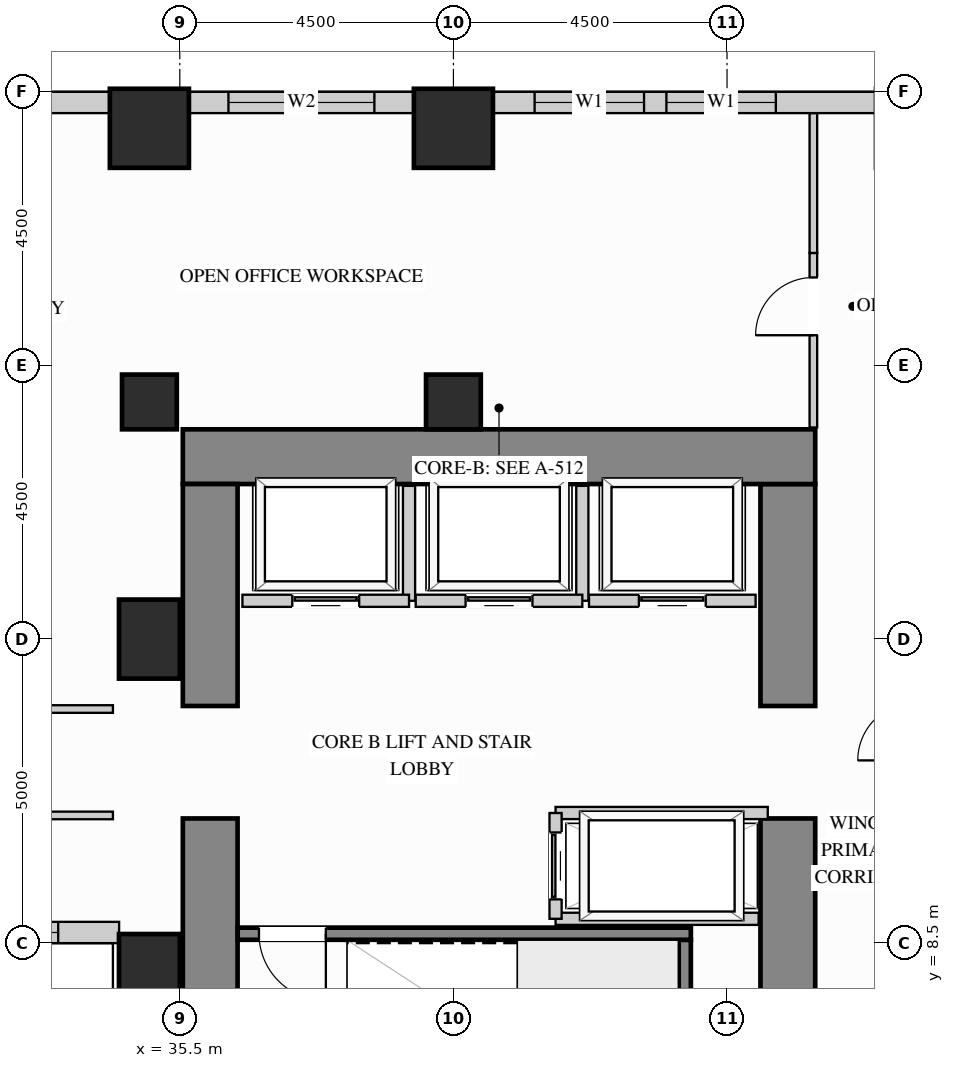
"""IFC4 building model, lengths in metres.
Left out: names, types, materials, properties, quantities, classifications, styles, units other than length and angle.
Written with IfcOpenShell. Run it as: python <this file> out.ifc"""

import sys

from ifc_helpers import new_model, si_unit, direction, frame, frame_2d, origin, origin_2d, place, context, subcontext, project, spatial, rectangle, extrude, source, transform, mapped, element, fill, save


model = new_model("IFC4")
c1 = context("Model", 3, precision=1e-05, world=origin(), true_north=direction((0.0, 1.0)))
c2 = subcontext(c1, "Body", "Model", "MODEL_VIEW")
j1 = project(units=[si_unit("LENGTHUNIT", "METRE"), si_unit("PLANEANGLEUNIT", "RADIAN")], contexts=[c1])
p1 = place(None, origin())
s1 = spatial("IfcSite", under=j1, at=p1, CompositionType="ELEMENT")
p2 = place(p1, origin())
s2 = spatial("IfcBuilding", under=s1, at=p2, CompositionType="ELEMENT")
p3 = place(p2, frame((0.0, 0.0, 65.7)))
s3 = spatial("IfcBuildingStorey", under=s2, at=p3, CompositionType="ELEMENT", Elevation=65.7)
m1 = source(origin(), c2, "Body", "SweptSolid", [
    extrude(rectangle(XDim=0.9, YDim=0.9, at=origin_2d()), origin(), (0.0, 0.0, 1.0), 3.38),
])
for number, where, z_axis, x_axis in (
    (1, (35.0, 17.4, 0.0), (0.0, 0.0, 1.0), (1.0, 0.0, 0.0)),
    (2, (40.0, 17.4, 0.0), (0.0, 0.0, 1.0), (1.0, 0.0, 0.0)),
):
    element("IfcColumn", number, at=place(p3, frame(where, z_axis=z_axis, x_axis=x_axis)), inside=s3, PredefinedType="COLUMN", context=c2, shape_type="MappedRepresentation", body=[
        mapped(m1, transform((0.0, 0.0, 0.0), x_axis=(1.0, 0.0, 0.0), y_axis=(0.0, 1.0, 0.0), z_axis=(0.0, 0.0, 1.0))),
    ])
m2 = source(origin(), c2, "Body", "SweptSolid", [
    extrude(rectangle(XDim=1.0, YDim=1.3, at=origin_2d()), origin(), (0.0, 0.0, 1.0), 3.38),
])
for number, where, z_axis, x_axis in (
    (3, (35.0, 13.5, 0.0), (0.0, 0.0, 1.0), (1.0, 0.0, 0.0)),
    (4, (35.0, 8.0, 0.0), (0.0, 0.0, 1.0), (1.0, 0.0, 0.0)),
):
    element("IfcColumn", number, at=place(p3, frame(where, z_axis=z_axis, x_axis=x_axis)), inside=s3, PredefinedType="COLUMN", context=c2, shape_type="MappedRepresentation", body=[
        mapped(m2, transform((0.0, 0.0, 0.0), x_axis=(1.0, 0.0, 0.0), y_axis=(0.0, 1.0, 0.0), z_axis=(0.0, 0.0, 1.0))),
    ])
m3 = source(origin(), c2, "Body", "SweptSolid", [
    extrude(rectangle(XDim=1.3, YDim=1.3, at=origin_2d()), origin(), (0.0, 0.0, 1.0), 3.38),
])
for number, where, z_axis, x_axis in (
    (5, (35.0, 21.9, 0.0), (0.0, 0.0, 1.0), (1.0, 0.0, 0.0)),
    (6, (40.0, 21.9, 0.0), (0.0, 0.0, 1.0), (1.0, 0.0, 0.0)),
):
    element("IfcColumn", number, at=place(p3, frame(where, z_axis=z_axis, x_axis=x_axis)), inside=s3, PredefinedType="COLUMN", context=c2, shape_type="MappedRepresentation", body=[
        mapped(m3, transform((0.0, 0.0, 0.0), x_axis=(1.0, 0.0, 0.0), y_axis=(0.0, 1.0, 0.0), z_axis=(0.0, 0.0, 1.0))),
    ])
m4 = source(origin(), c2, "Body", "SweptSolid", [
    extrude(rectangle(XDim=5.6, YDim=0.9, at=frame_2d((2.8, 0.0))), origin(), (0.0, 0.0, 1.0), 3.38),
])
p4 = place(p3, frame((45.5, 4.95, 0.0), z_axis=(0.0, 0.0, 1.0), x_axis=(0.0, 1.0, 0.0)))
e7 = element("IfcWall", 7, at=p4, inside=s3, PredefinedType="SHEAR", context=c2, shape_type="MappedRepresentation", body=[
    mapped(m4, transform((0.0, 0.0, 0.0), x_axis=(1.0, 0.0, 0.0), y_axis=(0.0, 1.0, 0.0), z_axis=(0.0, 0.0, 1.0))),
])
m5 = source(origin(), c2, "Body", "SweptSolid", [
    extrude(rectangle(XDim=3.65, YDim=0.9, at=frame_2d((1.825, 0.0))), origin(), (0.0, 0.0, 1.0), 3.38),
])
p5 = place(p3, frame((45.5, 12.4, 0.0), z_axis=(0.0, 0.0, 1.0), x_axis=(0.0, 1.0, 0.0)))
e8 = element("IfcWall", 8, at=p5, inside=s3, PredefinedType="SHEAR", context=c2, shape_type="MappedRepresentation", body=[
    mapped(m5, transform((0.0, 0.0, 0.0), x_axis=(1.0, 0.0, 0.0), y_axis=(0.0, 1.0, 0.0), z_axis=(0.0, 0.0, 1.0))),
])
m6 = source(origin(), c2, "Body", "SweptSolid", [
    extrude(rectangle(XDim=10.4, YDim=0.9, at=frame_2d((5.2, 0.0))), origin(), (0.0, 0.0, 1.0), 3.38),
])
p6 = place(p3, frame((35.55, 16.5, 0.0), z_axis=(0.0, 0.0, 1.0), x_axis=(1.0, 0.0, 0.0)))
e9 = element("IfcWall", 9, at=p6, inside=s3, PredefinedType="SHEAR", context=c2, shape_type="MappedRepresentation", body=[
    mapped(m6, transform((0.0, 0.0, 0.0), x_axis=(1.0, 0.0, 0.0), y_axis=(0.0, 1.0, 0.0), z_axis=(0.0, 0.0, 1.0))),
])
p7 = place(p3, frame((36.0, 4.95, 0.0), z_axis=(0.0, 0.0, 1.0), x_axis=(0.0, 1.0, 0.0)))
e10 = element("IfcWall", 10, at=p7, inside=s3, PredefinedType="SHEAR", context=c2, shape_type="MappedRepresentation", body=[
    mapped(m4, transform((0.0, 0.0, 0.0), x_axis=(1.0, 0.0, 0.0), y_axis=(0.0, 1.0, 0.0), z_axis=(0.0, 0.0, 1.0))),
])
p8 = place(p3, frame((36.0, 12.4, 0.0), z_axis=(0.0, 0.0, 1.0), x_axis=(0.0, 1.0, 0.0)))
e11 = element("IfcWall", 11, at=p8, inside=s3, PredefinedType="SHEAR", context=c2, shape_type="MappedRepresentation", body=[
    mapped(m5, transform((0.0, 0.0, 0.0), x_axis=(1.0, 0.0, 0.0), y_axis=(0.0, 1.0, 0.0), z_axis=(0.0, 0.0, 1.0))),
])
p9 = place(p3, frame((30.998, 8.675, 0.0), z_axis=(0.0, 0.0, 1.0), x_axis=(1.0, 0.0, 0.0)))
e12 = element("IfcWall", 12, at=p9, inside=s3, PredefinedType="SOLIDWALL", context=c2, shape_type="SweptSolid", body=[
    extrude(rectangle(XDim=3.504, YDim=0.35, at=frame_2d((1.752, 0.0))), origin(), (0.0, 0.0, 1.0), 3.365),
])
p10 = place(p9, frame((1.002, 0.0, 0.78)))
e13 = element("IfcOpeningElement", 13, at=p10, cuts=e12, PredefinedType="OPENING", context=c2, shape_type="SweptSolid", body=[
    extrude(rectangle(XDim=1.5, YDim=2.0, at=frame_2d((0.75, 1.0))), frame((0.0, 0.185, 0.0), z_axis=(0.0, -1.0, 0.0), x_axis=(1.0, 0.0, 0.0)), (0.0, 0.0, 1.0), 0.37),
])
p11 = place(p3, frame((46.952, 22.325, 0.0), z_axis=(0.0, 0.0, 1.0), x_axis=(-1.0, 0.0, 0.0)))
e14 = element("IfcWall", 14, at=p11, inside=s3, PredefinedType="SOLIDWALL", context=c2, shape_type="SweptSolid", body=[
    extrude(rectangle(XDim=6.304, YDim=0.35, at=frame_2d((3.152, 0.0))), origin(), (0.0, 0.0, 1.0), 2.51),
])
p12 = place(p11, frame((1.649, 0.0, 0.78)))
e15 = element("IfcOpeningElement", 15, at=p12, cuts=e14, PredefinedType="OPENING", context=c2, shape_type="SweptSolid", body=[
    extrude(rectangle(XDim=1.8, YDim=1.55, at=frame_2d((0.9, 0.775))), frame((0.0, 0.185, 0.0), z_axis=(0.0, -1.0, 0.0), x_axis=(1.0, 0.0, 0.0)), (0.0, 0.0, 1.0), 0.37),
])
p13 = place(p11, frame((3.817, 0.0, 0.78)))
e16 = element("IfcOpeningElement", 16, at=p13, cuts=e14, PredefinedType="OPENING", context=c2, shape_type="SweptSolid", body=[
    extrude(rectangle(XDim=1.8, YDim=1.55, at=frame_2d((0.9, 0.775))), frame((0.0, 0.185, 0.0), z_axis=(0.0, -1.0, 0.0), x_axis=(1.0, 0.0, 0.0)), (0.0, 0.0, 1.0), 0.37),
])
p14 = place(p3, frame((39.352, 22.325, 0.0), z_axis=(0.0, 0.0, 1.0), x_axis=(-1.0, 0.0, 0.0)))
e17 = element("IfcWall", 17, at=p14, inside=s3, PredefinedType="SOLIDWALL", context=c2, shape_type="SweptSolid", body=[
    extrude(rectangle(XDim=3.704, YDim=0.35, at=frame_2d((1.852, 0.0))), origin(), (0.0, 0.0, 1.0), 2.51),
])
p15 = place(p14, frame((0.652, 0.0, 0.78)))
e18 = element("IfcOpeningElement", 18, at=p15, cuts=e17, PredefinedType="OPENING", context=c2, shape_type="SweptSolid", body=[
    extrude(rectangle(XDim=2.4, YDim=1.55, at=frame_2d((1.2, 0.775))), frame((0.0, 0.185, 0.0), z_axis=(0.0, -1.0, 0.0), x_axis=(1.0, 0.0, 0.0)), (0.0, 0.0, 1.0), 0.37),
])
p16 = place(p3, frame((34.352, 22.325, 0.0), z_axis=(0.0, 0.0, 1.0), x_axis=(-1.0, 0.0, 0.0)))
e19 = element("IfcWall", 19, at=p16, inside=s3, PredefinedType="SOLIDWALL", context=c2, shape_type="SweptSolid", body=[
    extrude(rectangle(XDim=14.854, YDim=0.35, at=frame_2d((7.427, 0.0))), origin(), (0.0, 0.0, 1.0), 3.365),
])
p17 = place(p16, frame((4.058, 0.0, 0.78)))
e20 = element("IfcOpeningElement", 20, at=p17, cuts=e19, PredefinedType="OPENING", context=c2, shape_type="SweptSolid", body=[
    extrude(rectangle(XDim=1.5, YDim=2.0, at=frame_2d((0.75, 1.0))), frame((0.0, 0.185, 0.0), z_axis=(0.0, -1.0, 0.0), x_axis=(1.0, 0.0, 0.0)), (0.0, 0.0, 1.0), 0.37),
])
p18 = place(p16, frame((9.296, 0.0, 0.78)))
e21 = element("IfcOpeningElement", 21, at=p18, cuts=e19, PredefinedType="OPENING", context=c2, shape_type="SweptSolid", body=[
    extrude(rectangle(XDim=1.5, YDim=2.0, at=frame_2d((0.75, 1.0))), frame((0.0, 0.185, 0.0), z_axis=(0.0, -1.0, 0.0), x_axis=(1.0, 0.0, 0.0)), (0.0, 0.0, 1.0), 0.37),
])
p19 = place(p3, frame((45.92, 16.98, 0.0), z_axis=(0.0, 0.0, 1.0), x_axis=(0.0, 1.0, 0.0)))
e22 = element("IfcWall", 22, at=p19, inside=s3, PredefinedType="PARTITIONING", context=c2, shape_type="SweptSolid", body=[
    extrude(rectangle(XDim=2.87, YDim=0.125, at=frame_2d((1.435, 0.0))), origin(), (0.0, 0.0, 1.0), 3.365),
])
p20 = place(p19, frame((1.517, 0.0, 0.0)))
e23 = element("IfcOpeningElement", 23, at=p20, cuts=e22, PredefinedType="OPENING", context=c2, shape_type="SweptSolid", body=[
    extrude(rectangle(XDim=0.95, YDim=2.15, at=frame_2d((0.475, 1.075))), frame((0.0, 0.073, 0.0), z_axis=(0.0, -1.0, 0.0), x_axis=(1.0, 0.0, 0.0)), (0.0, 0.0, 1.0), 0.145),
])
m7 = source(origin(), c2, "Body", "SweptSolid", [
    extrude(rectangle(XDim=2.298, YDim=0.125, at=frame_2d((1.149, 0.0))), origin(), (0.0, 0.0, 1.0), 3.365),
])
p21 = place(p3, frame((45.92, 19.85, 0.0), z_axis=(0.0, 0.0, 1.0), x_axis=(0.0, 1.0, 0.0)))
e24 = element("IfcWall", 24, at=p21, inside=s3, PredefinedType="PARTITIONING", context=c2, shape_type="MappedRepresentation", body=[
    mapped(m7, transform((0.0, 0.0, 0.0), x_axis=(1.0, 0.0, 0.0), y_axis=(0.0, 1.0, 0.0), z_axis=(0.0, 0.0, 1.0))),
])
p22 = place(p3, frame((29.85, 12.35, 0.0), z_axis=(0.0, 0.0, 1.0), x_axis=(1.0, 0.0, 0.0)))
e25 = element("IfcWall", 25, at=p22, inside=s3, PredefinedType="PARTITIONING", context=c2, shape_type="SweptSolid", body=[
    extrude(rectangle(XDim=4.55, YDim=0.125, at=frame_2d((2.275, 0.0))), origin(), (0.0, 0.0, 1.0), 3.365),
])
p23 = place(p22, frame((1.8, 0.0, 0.0)))
e26 = element("IfcOpeningElement", 26, at=p23, cuts=e25, PredefinedType="OPENING", context=c2, shape_type="SweptSolid", body=[
    extrude(rectangle(XDim=0.95, YDim=2.15, at=frame_2d((0.475, 1.075))), frame((0.0, 0.073, 0.0), z_axis=(0.0, -1.0, 0.0), x_axis=(1.0, 0.0, 0.0)), (0.0, 0.0, 1.0), 0.145),
])
p24 = place(p3, frame((19.5, 10.6, 0.0), z_axis=(0.0, 0.0, 1.0), x_axis=(1.0, 0.0, 0.0)))
e27 = element("IfcWall", 27, at=p24, inside=s3, PredefinedType="PARTITIONING", context=c2, shape_type="SweptSolid", body=[
    extrude(rectangle(XDim=14.9, YDim=0.125, at=frame_2d((7.45, 0.0))), origin(), (0.0, 0.0, 1.0), 3.365),
])
p25 = place(p24, frame((6.975, 0.0, 0.0)))
e28 = element("IfcOpeningElement", 28, at=p25, cuts=e27, PredefinedType="OPENING", context=c2, shape_type="SweptSolid", body=[
    extrude(rectangle(XDim=0.95, YDim=2.15, at=frame_2d((0.475, 1.075))), frame((0.0, 0.073, 0.0), z_axis=(0.0, -1.0, 0.0), x_axis=(1.0, 0.0, 0.0)), (0.0, 0.0, 1.0), 0.145),
])
m8 = source(origin(), c2, "Body", "SweptSolid", [
    extrude(rectangle(XDim=1.89, YDim=0.2, at=frame_2d((0.945, 0.0))), origin(), (0.0, 0.0, 1.0), 3.365),
])
p26 = place(p3, frame((39.27, 14.13, 0.0), z_axis=(0.0, 0.0, 1.0), x_axis=(0.0, 1.0, 0.0)))
e29 = element("IfcWall", 29, at=p26, inside=s3, PredefinedType="PARTITIONING", context=c2, shape_type="MappedRepresentation", body=[
    mapped(m8, transform((0.0, 0.0, 0.0), x_axis=(1.0, 0.0, 0.0), y_axis=(0.0, 1.0, 0.0), z_axis=(0.0, 0.0, 1.0))),
])
p27 = place(p3, frame((36.53, 14.13, 0.0), z_axis=(0.0, 0.0, 1.0), x_axis=(1.0, 0.0, 0.0)))
e30 = element("IfcWall", 30, at=p27, inside=s3, PredefinedType="PARTITIONING", context=c2, shape_type="SweptSolid", body=[
    extrude(rectangle(XDim=2.74, YDim=0.2, at=frame_2d((1.37, 0.0))), origin(), (0.0, 0.0, 1.0), 3.365),
])
p28 = place(p27, frame((0.82, 0.0, 0.0)))
e31 = element("IfcOpeningElement", 31, at=p28, cuts=e30, PredefinedType="OPENING", context=c2, shape_type="SweptSolid", body=[
    extrude(rectangle(XDim=1.1, YDim=2.2, at=frame_2d((0.55, 1.1))), frame((0.0, 0.11, 0.0), z_axis=(0.0, -1.0, 0.0), x_axis=(1.0, 0.0, 0.0)), (0.0, 0.0, 1.0), 0.22),
])
p29 = place(p3, frame((42.12, 14.13, 0.0), z_axis=(0.0, 0.0, 1.0), x_axis=(0.0, 1.0, 0.0)))
e32 = element("IfcWall", 32, at=p29, inside=s3, PredefinedType="PARTITIONING", context=c2, shape_type="MappedRepresentation", body=[
    mapped(m8, transform((0.0, 0.0, 0.0), x_axis=(1.0, 0.0, 0.0), y_axis=(0.0, 1.0, 0.0), z_axis=(0.0, 0.0, 1.0))),
])
p30 = place(p3, frame((39.38, 14.13, 0.0), z_axis=(0.0, 0.0, 1.0), x_axis=(1.0, 0.0, 0.0)))
e33 = element("IfcWall", 33, at=p30, inside=s3, PredefinedType="PARTITIONING", context=c2, shape_type="SweptSolid", body=[
    extrude(rectangle(XDim=2.74, YDim=0.2, at=frame_2d((1.37, 0.0))), origin(), (0.0, 0.0, 1.0), 3.365),
])
p31 = place(p30, frame((0.82, 0.0, 0.0)))
e34 = element("IfcOpeningElement", 34, at=p31, cuts=e33, PredefinedType="OPENING", context=c2, shape_type="SweptSolid", body=[
    extrude(rectangle(XDim=1.1, YDim=2.2, at=frame_2d((0.55, 1.1))), frame((0.0, 0.11, 0.0), z_axis=(0.0, -1.0, 0.0), x_axis=(1.0, 0.0, 0.0)), (0.0, 0.0, 1.0), 0.22),
])
p32 = place(p3, frame((42.23, 14.13, 0.0), z_axis=(0.0, 0.0, 1.0), x_axis=(1.0, 0.0, 0.0)))
e35 = element("IfcWall", 35, at=p32, inside=s3, PredefinedType="PARTITIONING", context=c2, shape_type="SweptSolid", body=[
    extrude(rectangle(XDim=2.74, YDim=0.2, at=frame_2d((1.37, 0.0))), origin(), (0.0, 0.0, 1.0), 3.365),
])
p33 = place(p32, frame((0.82, 0.0, 0.0)))
e36 = element("IfcOpeningElement", 36, at=p33, cuts=e35, PredefinedType="OPENING", context=c2, shape_type="SweptSolid", body=[
    extrude(rectangle(XDim=1.1, YDim=2.2, at=frame_2d((0.55, 1.1))), frame((0.0, 0.11, 0.0), z_axis=(0.0, -1.0, 0.0), x_axis=(1.0, 0.0, 0.0)), (0.0, 0.0, 1.0), 0.22),
])
m9 = source(origin(), c2, "Body", "SweptSolid", [
    extrude(rectangle(XDim=3.49, YDim=0.2, at=frame_2d((1.745, 0.0))), origin(), (0.0, 0.0, 1.0), 3.365),
])
p34 = place(p3, frame((41.68, 10.64, 0.0), z_axis=(0.0, 0.0, 1.0), x_axis=(1.0, 0.0, 0.0)))
e37 = element("IfcWall", 37, at=p34, inside=s3, PredefinedType="PARTITIONING", context=c2, shape_type="MappedRepresentation", body=[
    mapped(m9, transform((0.0, 0.0, 0.0), x_axis=(1.0, 0.0, 0.0), y_axis=(0.0, 1.0, 0.0), z_axis=(0.0, 0.0, 1.0))),
])
m10 = source(origin(), c2, "Body", "SweptSolid", [
    extrude(rectangle(XDim=3.34, YDim=0.2, at=frame_2d((1.67, 0.0))), origin(), (0.0, 0.0, 1.0), 3.365),
])
p35 = place(p3, frame((41.68, 8.9, 0.0), z_axis=(0.0, 0.0, 1.0), x_axis=(1.0, 0.0, 0.0)))
e38 = element("IfcWall", 38, at=p35, inside=s3, PredefinedType="PARTITIONING", context=c2, shape_type="MappedRepresentation", body=[
    mapped(m10, transform((0.0, 0.0, 0.0), x_axis=(1.0, 0.0, 0.0), y_axis=(0.0, 1.0, 0.0), z_axis=(0.0, 0.0, 1.0))),
])
p36 = place(p3, frame((41.68, 8.9, 0.0), z_axis=(0.0, 0.0, 1.0), x_axis=(0.0, 1.0, 0.0)))
e39 = element("IfcWall", 39, at=p36, inside=s3, PredefinedType="PARTITIONING", context=c2, shape_type="SweptSolid", body=[
    extrude(rectangle(XDim=1.74, YDim=0.2, at=frame_2d((0.87, 0.0))), origin(), (0.0, 0.0, 1.0), 3.365),
])
p37 = place(p36, frame((0.32, 0.0, 0.0)))
e40 = element("IfcOpeningElement", 40, at=p37, cuts=e39, PredefinedType="OPENING", context=c2, shape_type="SweptSolid", body=[
    extrude(rectangle(XDim=1.1, YDim=2.2, at=frame_2d((0.55, 1.1))), frame((0.0, 0.11, 0.0), z_axis=(0.0, -1.0, 0.0), x_axis=(1.0, 0.0, 0.0)), (0.0, 0.0, 1.0), 0.22),
])
m11 = source(origin(), c2, "Body", "SweptSolid", [
    extrude(rectangle(XDim=3.603, YDim=0.2, at=frame_2d((1.802, 0.0))), origin(), (0.0, 0.0, 1.0), 3.38),
])
p38 = place(p3, frame((43.805, 4.952, 0.0), z_axis=(0.0, 0.0, 1.0), x_axis=(0.0, 1.0, 0.0)))
e41 = element("IfcWall", 41, at=p38, inside=s3, PredefinedType="SHEAR", context=c2, shape_type="MappedRepresentation", body=[
    mapped(m11, transform((0.0, 0.0, 0.0), x_axis=(1.0, 0.0, 0.0), y_axis=(0.0, 1.0, 0.0), z_axis=(0.0, 0.0, 1.0))),
])
p39 = place(p3, frame((36.452, 8.655, 0.0), z_axis=(0.0, 0.0, 1.0), x_axis=(1.0, 0.0, 0.0)))
e42 = element("IfcWall", 42, at=p39, inside=s3, PredefinedType="SHEAR", context=c2, shape_type="SweptSolid", body=[
    extrude(rectangle(XDim=7.453, YDim=0.2, at=frame_2d((3.727, 0.0))), origin(), (0.0, 0.0, 1.0), 3.38),
])
p40 = place(p39, frame((0.35, 0.0, 0.0)))
e43 = element("IfcOpeningElement", 43, at=p40, cuts=e42, PredefinedType="OPENING", context=c2, shape_type="SweptSolid", body=[
    extrude(rectangle(XDim=1.1, YDim=2.15, at=frame_2d((0.55, 1.075))), frame((0.0, 0.11, 0.0), z_axis=(0.0, -1.0, 0.0), x_axis=(1.0, 0.0, 0.0)), (0.0, 0.0, 1.0), 0.22),
])
m12 = source(origin(), c2, "Body", "SweptSolid", [
    extrude(rectangle(XDim=1.1, YDim=2.2, at=frame_2d((0.55, 1.1))), frame((0.0, 0.025, 0.0), z_axis=(0.0, -1.0, 0.0), x_axis=(1.0, 0.0, 0.0)), (0.0, 0.0, 1.0), 0.05),
])
p41 = place(p28, origin())
e44 = element("IfcDoor", 44, at=p41, inside=s3, OperationType="SLIDING_TO_LEFT", PredefinedType="DOOR", context=c2, shape_type="MappedRepresentation", body=[
    mapped(m12, transform((0.0, 0.0, 0.0), x_axis=(1.0, 0.0, 0.0), y_axis=(0.0, 1.0, 0.0), z_axis=(0.0, 0.0, 1.0))),
])
fill(e31, e44)
p42 = place(p31, origin())
e45 = element("IfcDoor", 45, at=p42, inside=s3, OperationType="SLIDING_TO_LEFT", PredefinedType="DOOR", context=c2, shape_type="MappedRepresentation", body=[
    mapped(m12, transform((0.0, 0.0, 0.0), x_axis=(1.0, 0.0, 0.0), y_axis=(0.0, 1.0, 0.0), z_axis=(0.0, 0.0, 1.0))),
])
fill(e34, e45)
p43 = place(p33, origin())
e46 = element("IfcDoor", 46, at=p43, inside=s3, OperationType="SLIDING_TO_LEFT", PredefinedType="DOOR", context=c2, shape_type="MappedRepresentation", body=[
    mapped(m12, transform((0.0, 0.0, 0.0), x_axis=(1.0, 0.0, 0.0), y_axis=(0.0, 1.0, 0.0), z_axis=(0.0, 0.0, 1.0))),
])
fill(e36, e46)
p44 = place(p37, origin())
e47 = element("IfcDoor", 47, at=p44, inside=s3, OperationType="SLIDING_TO_LEFT", PredefinedType="DOOR", context=c2, shape_type="MappedRepresentation", body=[
    mapped(m12, transform((0.0, 0.0, 0.0), x_axis=(1.0, 0.0, 0.0), y_axis=(0.0, 1.0, 0.0), z_axis=(0.0, 0.0, 1.0))),
])
fill(e40, e47)
m13 = source(origin(), c2, "Body", "SweptSolid", [
    extrude(rectangle(XDim=0.95, YDim=2.15, at=frame_2d((0.475, 1.075))), frame((0.0, 0.025, 0.0), z_axis=(0.0, -1.0, 0.0), x_axis=(1.0, 0.0, 0.0)), (0.0, 0.0, 1.0), 0.05),
])
p45 = place(p20, origin())
e48 = element("IfcDoor", 48, at=p45, inside=s3, OperationType="SINGLE_SWING_LEFT", PredefinedType="DOOR", context=c2, shape_type="MappedRepresentation", body=[
    mapped(m13, transform((0.0, 0.0, 0.0), x_axis=(1.0, 0.0, 0.0), y_axis=(0.0, 1.0, 0.0), z_axis=(0.0, 0.0, 1.0))),
])
fill(e23, e48)
m14 = source(origin(), c2, "Body", "SweptSolid", [
    extrude(rectangle(XDim=1.1, YDim=2.15, at=frame_2d((0.55, 1.075))), frame((0.0, 0.025, 0.0), z_axis=(0.0, -1.0, 0.0), x_axis=(1.0, 0.0, 0.0)), (0.0, 0.0, 1.0), 0.05),
])
p46 = place(p40, origin())
e49 = element("IfcDoor", 49, at=p46, inside=s3, OperationType="SINGLE_SWING_RIGHT", PredefinedType="DOOR", context=c2, shape_type="MappedRepresentation", body=[
    mapped(m14, transform((0.0, 0.0, 0.0), x_axis=(1.0, 0.0, 0.0), y_axis=(0.0, 1.0, 0.0), z_axis=(0.0, 0.0, 1.0))),
])
fill(e43, e49)
m15 = source(origin(), c2, "Body", "SweptSolid", [
    extrude(rectangle(XDim=1.8, YDim=1.55, at=frame_2d((0.9, 0.775))), frame((0.0, 0.03, 0.0), z_axis=(0.0, -1.0, 0.0), x_axis=(1.0, 0.0, 0.0)), (0.0, 0.0, 1.0), 0.06),
])
p47 = place(p12, origin())
e50 = element("IfcWindow", 50, at=p47, inside=s3, PartitioningType="SINGLE_PANEL", PredefinedType="WINDOW", context=c2, shape_type="MappedRepresentation", body=[
    mapped(m15, transform((0.0, 0.0, 0.0), x_axis=(1.0, 0.0, 0.0), y_axis=(0.0, 1.0, 0.0), z_axis=(0.0, 0.0, 1.0))),
])
fill(e15, e50)
p48 = place(p13, origin())
e51 = element("IfcWindow", 51, at=p48, inside=s3, PartitioningType="SINGLE_PANEL", PredefinedType="WINDOW", context=c2, shape_type="MappedRepresentation", body=[
    mapped(m15, transform((0.0, 0.0, 0.0), x_axis=(1.0, 0.0, 0.0), y_axis=(0.0, 1.0, 0.0), z_axis=(0.0, 0.0, 1.0))),
])
fill(e16, e51)
m16 = source(origin(), c2, "Body", "SweptSolid", [
    extrude(rectangle(XDim=2.4, YDim=1.55, at=frame_2d((1.2, 0.775))), frame((0.0, 0.03, 0.0), z_axis=(0.0, -1.0, 0.0), x_axis=(1.0, 0.0, 0.0)), (0.0, 0.0, 1.0), 0.06),
])
p49 = place(p15, origin())
e52 = element("IfcWindow", 52, at=p49, inside=s3, PartitioningType="SINGLE_PANEL", PredefinedType="WINDOW", context=c2, shape_type="MappedRepresentation", body=[
    mapped(m16, transform((0.0, 0.0, 0.0), x_axis=(1.0, 0.0, 0.0), y_axis=(0.0, 1.0, 0.0), z_axis=(0.0, 0.0, 1.0))),
])
fill(e18, e52)
m17 = source(origin(), c2, "Body", "SweptSolid", [
    extrude(rectangle(XDim=1.5, YDim=2.0, at=frame_2d((0.75, 1.0))), frame((0.0, 0.03, 0.0), z_axis=(0.0, -1.0, 0.0), x_axis=(1.0, 0.0, 0.0)), (0.0, 0.0, 1.0), 0.06),
])
p50 = place(p10, origin())
e53 = element("IfcWindow", 53, at=p50, inside=s3, PartitioningType="SINGLE_PANEL", PredefinedType="WINDOW", context=c2, shape_type="MappedRepresentation", body=[
    mapped(m17, transform((0.0, 0.0, 0.0), x_axis=(1.0, 0.0, 0.0), y_axis=(0.0, 1.0, 0.0), z_axis=(0.0, 0.0, 1.0))),
])
fill(e13, e53)
save(model, sys.argv[1])
